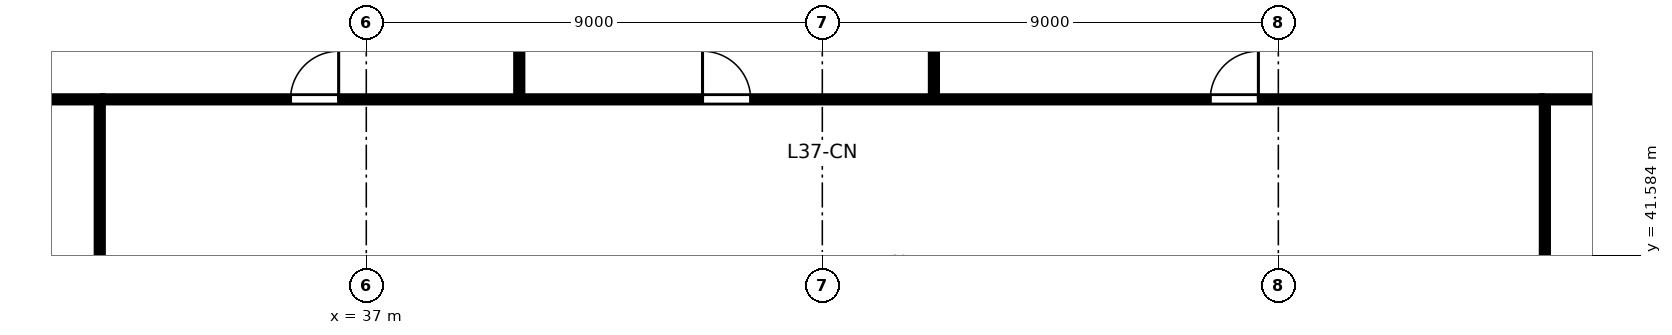
"""IFC4 building model, lengths in metres.
Left out: names, types, materials, properties, quantities, classifications, styles, units other than length and angle.
Written with IfcOpenShell. Run it as: python <this file> out.ifc"""

import sys

from ifc_helpers import new_model, si_unit, direction, frame, frame_2d, origin, place, context, subcontext, project, spatial, rectangle, extrude, element, fill, save


model = new_model("IFC4")
c1 = context("Model", 3, precision=1e-05, world=origin(), true_north=direction((0.0, 1.0)))
c2 = subcontext(c1, "Body", "Model", "MODEL_VIEW")
j1 = project(units=[si_unit("LENGTHUNIT", "METRE"), si_unit("PLANEANGLEUNIT", "RADIAN")], contexts=[c1])
p1 = place(None, origin())
s1 = spatial("IfcSite", under=j1, at=p1, CompositionType="ELEMENT")
p2 = place(p1, origin())
s2 = spatial("IfcBuilding", under=s1, at=p2, CompositionType="ELEMENT")
p3 = place(p2, frame((0.0, 0.0, 142.0)))
s3 = spatial("IfcBuildingStorey", under=s2, at=p3, CompositionType="ELEMENT", Elevation=142.0)
p4 = place(p3, frame((40.019, 44.66, 0.0), z_axis=(0.0, 0.0, 1.0), x_axis=(0.0, 1.0, 0.0)))
e1 = element("IfcWall", 1, at=p4, inside=s3, PredefinedType="PARTITIONING", context=c2, shape_type="SweptSolid", body=[
    extrude(rectangle(XDim=7.46, YDim=0.12, at=frame_2d((3.73, 0.0))), origin(), (0.0, 0.0, 1.0), 2.64),
])
p5 = place(p4, frame((1.4, 0.0, 0.0)))
e2 = element("IfcOpeningElement", 2, at=p5, cuts=e1, PredefinedType="OPENING", context=c2, shape_type="SweptSolid", body=[
    extrude(rectangle(XDim=0.9, YDim=2.15, at=frame_2d((0.45, 1.075))), frame((0.0, 0.07, 0.0), z_axis=(0.0, -1.0, 0.0), x_axis=(1.0, 0.0, 0.0)), (0.0, 0.0, 1.0), 0.14),
])
p6 = place(p3, frame((48.202, 44.66, 0.0), z_axis=(0.0, 0.0, 1.0), x_axis=(0.0, 1.0, 0.0)))
e3 = element("IfcWall", 3, at=p6, inside=s3, PredefinedType="PARTITIONING", context=c2, shape_type="SweptSolid", body=[
    extrude(rectangle(XDim=7.46, YDim=0.12, at=frame_2d((3.73, 0.0))), origin(), (0.0, 0.0, 1.0), 2.64),
])
p7 = place(p6, frame((1.4, 0.0, 0.0)))
e4 = element("IfcOpeningElement", 4, at=p7, cuts=e3, PredefinedType="OPENING", context=c2, shape_type="SweptSolid", body=[
    extrude(rectangle(XDim=0.9, YDim=2.15, at=frame_2d((0.45, 1.075))), frame((0.0, 0.07, 0.0), z_axis=(0.0, -1.0, 0.0), x_axis=(1.0, 0.0, 0.0)), (0.0, 0.0, 1.0), 0.14),
])
p8 = place(p3, frame((31.8, 44.66, 0.0), z_axis=(0.0, 0.0, 1.0), x_axis=(1.0, 0.0, 0.0)))
e5 = element("IfcWall", 5, at=p8, inside=s3, PredefinedType="PARTITIONING", context=c2, shape_type="SweptSolid", body=[
    extrude(rectangle(XDim=28.4, YDim=0.12, at=frame_2d((14.2, 0.0))), origin(), (0.0, 0.0, 1.0), 2.64),
])
p9 = place(p8, frame((3.705, 0.0, 0.0)))
e6 = element("IfcOpeningElement", 6, at=p9, cuts=e5, PredefinedType="OPENING", context=c2, shape_type="SweptSolid", body=[
    extrude(rectangle(XDim=0.95, YDim=2.15, at=frame_2d((0.475, 1.075))), frame((0.0, 0.07, 0.0), z_axis=(0.0, -1.0, 0.0), x_axis=(1.0, 0.0, 0.0)), (0.0, 0.0, 1.0), 0.14),
])
p10 = place(p8, frame((11.836, 0.0, 0.0)))
e7 = element("IfcOpeningElement", 7, at=p10, cuts=e5, PredefinedType="OPENING", context=c2, shape_type="SweptSolid", body=[
    extrude(rectangle(XDim=0.95, YDim=2.15, at=frame_2d((0.475, 1.075))), frame((0.0, 0.07, 0.0), z_axis=(0.0, -1.0, 0.0), x_axis=(1.0, 0.0, 0.0)), (0.0, 0.0, 1.0), 0.14),
])
p11 = place(p8, frame((21.856, 0.0, 0.0)))
e8 = element("IfcOpeningElement", 8, at=p11, cuts=e5, PredefinedType="OPENING", context=c2, shape_type="SweptSolid", body=[
    extrude(rectangle(XDim=0.95, YDim=2.15, at=frame_2d((0.475, 1.075))), frame((0.0, 0.07, 0.0), z_axis=(0.0, -1.0, 0.0), x_axis=(1.0, 0.0, 0.0)), (0.0, 0.0, 1.0), 0.14),
])
p12 = place(p3, frame((31.74, 33.02, 0.0), z_axis=(0.0, 0.0, 1.0), x_axis=(0.0, 1.0, 0.0)))
e9 = element("IfcWall", 9, at=p12, inside=s3, PredefinedType="PARTITIONING", context=c2, shape_type="SweptSolid", body=[
    extrude(rectangle(XDim=11.58, YDim=0.12, at=frame_2d((5.79, 0.0))), origin(), (0.0, 0.0, 1.0), 2.64),
])
p13 = place(p12, frame((5.215, 0.0, 0.0)))
e10 = element("IfcOpeningElement", 10, at=p13, cuts=e9, PredefinedType="OPENING", context=c2, shape_type="SweptSolid", body=[
    extrude(rectangle(XDim=0.95, YDim=2.15, at=frame_2d((0.475, 1.075))), frame((0.0, 0.07, 0.0), z_axis=(0.0, -1.0, 0.0), x_axis=(1.0, 0.0, 0.0)), (0.0, 0.0, 1.0), 0.14),
])
p14 = place(p3, frame((60.26, 33.02, 0.0), z_axis=(0.0, 0.0, 1.0), x_axis=(0.0, 1.0, 0.0)))
e11 = element("IfcWall", 11, at=p14, inside=s3, PredefinedType="PARTITIONING", context=c2, shape_type="SweptSolid", body=[
    extrude(rectangle(XDim=11.58, YDim=0.12, at=frame_2d((5.79, 0.0))), origin(), (0.0, 0.0, 1.0), 2.64),
])
p15 = place(p14, frame((5.775, 0.0, 0.0)))
e12 = element("IfcOpeningElement", 12, at=p15, cuts=e11, PredefinedType="OPENING", context=c2, shape_type="SweptSolid", body=[
    extrude(rectangle(XDim=0.95, YDim=2.15, at=frame_2d((0.475, 1.075))), frame((0.0, 0.07, 0.0), z_axis=(0.0, -1.0, 0.0), x_axis=(1.0, 0.0, 0.0)), (0.0, 0.0, 1.0), 0.14),
])
for number, where, z_axis, x_axis in (
    (13, (31.8, 44.66, 0.0), (0.0, 0.0, 1.0), (-1.0, 0.0, 0.0)),
    (14, (60.2, 44.66, 0.0), (0.0, 0.0, 1.0), (1.0, 0.0, 0.0)),
):
    element("IfcWall", number, at=place(p3, frame(where, z_axis=z_axis, x_axis=x_axis)), inside=s3, PredefinedType="PARTITIONING", context=c2, shape_type="SweptSolid", body=[
        extrude(rectangle(XDim=8.62, YDim=0.12, at=frame_2d((4.31, 0.0))), origin(), (0.0, 0.0, 1.0), 2.64),
    ])
p16 = place(p9, origin())
e15 = element("IfcDoor", 15, at=p16, inside=s3, OperationType="SINGLE_SWING_RIGHT", PredefinedType="DOOR", context=c2, shape_type="SweptSolid", body=[
    extrude(rectangle(XDim=0.95, YDim=2.15, at=frame_2d((0.475, 1.075))), frame((0.0, 0.025, 0.0), z_axis=(0.0, -1.0, 0.0), x_axis=(1.0, 0.0, 0.0)), (0.0, 0.0, 1.0), 0.05),
])
fill(e6, e15)
p17 = place(p10, origin())
e16 = element("IfcDoor", 16, at=p17, inside=s3, OperationType="SINGLE_SWING_LEFT", PredefinedType="DOOR", context=c2, shape_type="SweptSolid", body=[
    extrude(rectangle(XDim=0.95, YDim=2.15, at=frame_2d((0.475, 1.075))), frame((0.0, 0.025, 0.0), z_axis=(0.0, -1.0, 0.0), x_axis=(1.0, 0.0, 0.0)), (0.0, 0.0, 1.0), 0.05),
])
fill(e7, e16)
p18 = place(p11, origin())
e17 = element("IfcDoor", 17, at=p18, inside=s3, OperationType="SINGLE_SWING_RIGHT", PredefinedType="DOOR", context=c2, shape_type="SweptSolid", body=[
    extrude(rectangle(XDim=0.95, YDim=2.15, at=frame_2d((0.475, 1.075))), frame((0.0, 0.025, 0.0), z_axis=(0.0, -1.0, 0.0), x_axis=(1.0, 0.0, 0.0)), (0.0, 0.0, 1.0), 0.05),
])
fill(e8, e17)
save(model, sys.argv[1])
